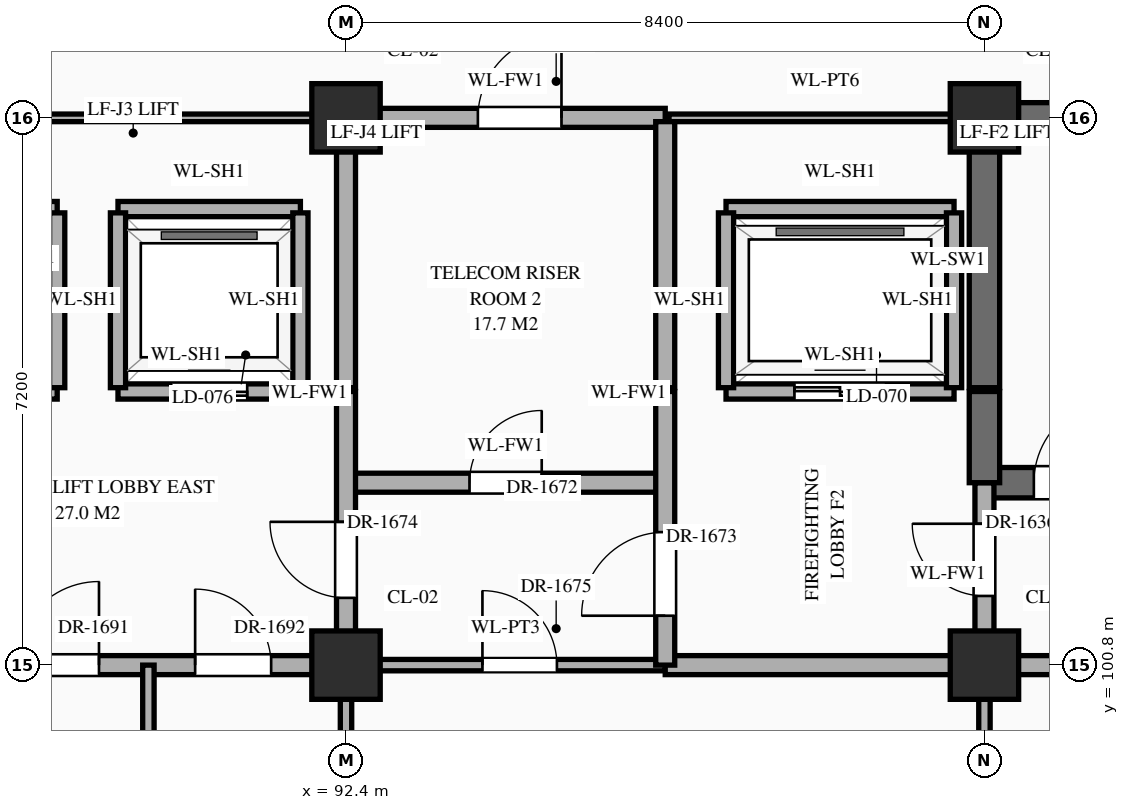
"""IFC4 building model, lengths in metres.
Left out: names, types, materials, properties, quantities, classifications, styles, units other than length and angle.
Written with IfcOpenShell. Run it as: python <this file> out.ifc"""

import sys

from ifc_helpers import new_model, si_unit, direction, frame, frame_2d, origin, origin_2d, place, context, subcontext, project, spatial, rectangle, extrude, element, fill, save


model = new_model("IFC4")
c1 = context("Model", 3, precision=1e-05, world=origin(), true_north=direction((0.0, 1.0)))
c2 = subcontext(c1, "Body", "Model", "MODEL_VIEW")
j1 = project(units=[si_unit("LENGTHUNIT", "METRE"), si_unit("PLANEANGLEUNIT", "RADIAN")], contexts=[c1])
p1 = place(None, origin())
s1 = spatial("IfcSite", under=j1, at=p1, CompositionType="ELEMENT")
p2 = place(p1, origin())
s2 = spatial("IfcBuilding", under=s1, at=p2, CompositionType="ELEMENT")
p3 = place(p2, frame((0.0, 0.0, 16.2)))
s3 = spatial("IfcBuildingStorey", under=s2, at=p3, CompositionType="ELEMENT", Elevation=16.2)
for number, where, z_axis, x_axis in (
    (1, (92.4, 100.8, 0.0), (0.0, 0.0, 1.0), (1.0, 0.0, 0.0)),
    (2, (92.4, 108.0, 0.0), (0.0, 0.0, 1.0), (1.0, 0.0, 0.0)),
    (3, (100.8, 100.8, 0.0), (0.0, 0.0, 1.0), (1.0, 0.0, 0.0)),
    (4, (100.8, 108.0, 0.0), (0.0, 0.0, 1.0), (1.0, 0.0, 0.0)),
):
    element("IfcColumn", number, at=place(p3, frame(where, z_axis=z_axis, x_axis=x_axis)), inside=s3, PredefinedType="COLUMN", context=c2, shape_type="SweptSolid", body=[
        extrude(rectangle(XDim=0.9, YDim=0.9, at=origin_2d()), origin(), (0.0, 0.0, 1.0), 5.4),
    ])
p4 = place(p3, frame((75.6, 100.8, 0.0), z_axis=(0.0, 0.0, 1.0), x_axis=(1.0, 0.0, 0.0)))
e5 = element("IfcWall", 5, at=p4, inside=s3, PredefinedType="STANDARD", context=c2, shape_type="SweptSolid", body=[
    extrude(rectangle(XDim=16.8, YDim=0.25, at=frame_2d((8.4, 0.0))), origin(), (0.0, 0.0, 1.0), 4.27),
])
p5 = place(p4, frame((3.65, 0.0, 0.0)))
e6 = element("IfcOpeningElement", 6, at=p5, cuts=e5, PredefinedType="OPENING", context=c2, shape_type="SweptSolid", body=[
    extrude(rectangle(XDim=1.1, YDim=2.2, at=frame_2d((0.55, 1.1))), frame((0.0, 0.137, 0.0), z_axis=(0.0, -1.0, 0.0), x_axis=(1.0, 0.0, 0.0)), (0.0, 0.0, 1.0), 0.274),
])
p6 = place(p4, frame((9.81, 0.0, 0.0)))
e7 = element("IfcOpeningElement", 7, at=p6, cuts=e5, PredefinedType="OPENING", context=c2, shape_type="SweptSolid", body=[
    extrude(rectangle(XDim=0.95, YDim=2.15, at=frame_2d((0.475, 1.075))), frame((0.0, 0.137, 0.0), z_axis=(0.0, -1.0, 0.0), x_axis=(1.0, 0.0, 0.0)), (0.0, 0.0, 1.0), 0.274),
])
p7 = place(p4, frame((12.45, 0.0, 0.0)))
e8 = element("IfcOpeningElement", 8, at=p7, cuts=e5, PredefinedType="OPENING", context=c2, shape_type="SweptSolid", body=[
    extrude(rectangle(XDim=1.1, YDim=2.2, at=frame_2d((0.55, 1.1))), frame((0.0, 0.137, 0.0), z_axis=(0.0, -1.0, 0.0), x_axis=(1.0, 0.0, 0.0)), (0.0, 0.0, 1.0), 0.274),
])
p8 = place(p4, frame((14.815, 0.0, 0.0)))
e9 = element("IfcOpeningElement", 9, at=p8, cuts=e5, PredefinedType="OPENING", context=c2, shape_type="SweptSolid", body=[
    extrude(rectangle(XDim=1.0, YDim=2.2, at=frame_2d((0.5, 1.1))), frame((0.0, 0.137, 0.0), z_axis=(0.0, -1.0, 0.0), x_axis=(1.0, 0.0, 0.0)), (0.0, 0.0, 1.0), 0.274),
])
p9 = place(p3, frame((92.4, 100.8, 0.0), z_axis=(0.0, 0.0, 1.0), x_axis=(1.0, 0.0, 0.0)))
e10 = element("IfcWall", 10, at=p9, inside=s3, PredefinedType="STANDARD", context=c2, shape_type="SweptSolid", body=[
    extrude(rectangle(XDim=4.2, YDim=0.15, at=frame_2d((2.1, 0.0))), origin(), (0.0, 0.0, 1.0), 4.27),
])
p10 = place(p9, frame((1.795, 0.0, 0.0)))
e11 = element("IfcOpeningElement", 11, at=p10, cuts=e10, PredefinedType="OPENING", context=c2, shape_type="SweptSolid", body=[
    extrude(rectangle(XDim=0.98, YDim=2.35, at=frame_2d((0.49, 1.175))), frame((0.0, 0.087, 0.0), z_axis=(0.0, -1.0, 0.0), x_axis=(1.0, 0.0, 0.0)), (0.0, 0.0, 1.0), 0.174),
])
p11 = place(p3, frame((96.6, 100.8, 0.0), z_axis=(0.0, 0.0, 1.0), x_axis=(1.0, 0.0, 0.0)))
e12 = element("IfcWall", 12, at=p11, inside=s3, PredefinedType="STANDARD", context=c2, shape_type="SweptSolid", body=[
    extrude(rectangle(XDim=12.6, YDim=0.25, at=frame_2d((6.3, 0.0))), origin(), (0.0, 0.0, 1.0), 4.27),
])
p12 = place(p11, frame((7.9, 0.0, 0.0)))
e13 = element("IfcOpeningElement", 13, at=p12, cuts=e12, PredefinedType="OPENING", context=c2, shape_type="SweptSolid", body=[
    extrude(rectangle(XDim=1.0, YDim=2.2, at=frame_2d((0.5, 1.1))), frame((0.0, 0.137, 0.0), z_axis=(0.0, -1.0, 0.0), x_axis=(1.0, 0.0, 0.0)), (0.0, 0.0, 1.0), 0.274),
])
p13 = place(p3, frame((92.4, 103.2, 0.0), z_axis=(0.0, 0.0, 1.0), x_axis=(1.0, 0.0, 0.0)))
e14 = element("IfcWall", 14, at=p13, inside=s3, PredefinedType="STANDARD", context=c2, shape_type="SweptSolid", body=[
    extrude(rectangle(XDim=4.2, YDim=0.25, at=frame_2d((2.1, 0.0))), origin(), (0.0, 0.0, 1.0), 5.12),
])
p14 = place(p13, frame((1.625, 0.0, 0.0)))
e15 = element("IfcOpeningElement", 15, at=p14, cuts=e14, PredefinedType="OPENING", context=c2, shape_type="SweptSolid", body=[
    extrude(rectangle(XDim=0.95, YDim=2.15, at=frame_2d((0.475, 1.075))), frame((0.0, 0.137, 0.0), z_axis=(0.0, -1.0, 0.0), x_axis=(1.0, 0.0, 0.0)), (0.0, 0.0, 1.0), 0.274),
])
p15 = place(p3, frame((100.8, 103.2, 0.0), z_axis=(0.0, 0.0, 1.0), x_axis=(1.0, 0.0, 0.0)))
e16 = element("IfcWall", 16, at=p15, inside=s3, PredefinedType="SHEAR", context=c2, shape_type="SweptSolid", body=[
    extrude(rectangle(XDim=8.4, YDim=0.4, at=frame_2d((4.2, 0.0))), origin(), (0.0, 0.0, 1.0), 5.12),
])
p16 = place(p15, frame((0.65, 0.0, 0.0)))
e17 = element("IfcOpeningElement", 17, at=p16, cuts=e16, PredefinedType="OPENING", context=c2, shape_type="SweptSolid", body=[
    extrude(rectangle(XDim=1.1, YDim=2.2, at=frame_2d((0.55, 1.1))), frame((0.0, 0.212, 0.0), z_axis=(0.0, -1.0, 0.0), x_axis=(1.0, 0.0, 0.0)), (0.0, 0.0, 1.0), 0.424),
])
p17 = place(p3, frame((86.2, 104.4, 0.0), z_axis=(0.0, 0.0, 1.0), x_axis=(1.0, 0.0, 0.0)))
e18 = element("IfcWall", 18, at=p17, inside=s3, PredefinedType="STANDARD", context=c2, shape_type="SweptSolid", body=[
    extrude(rectangle(XDim=2.4, YDim=0.2, at=frame_2d((1.2, 0.0))), origin(), (0.0, 0.0, 1.0), 5.12),
])
p18 = place(p17, frame((0.7, 0.0, 0.0)))
e19 = element("IfcOpeningElement", 19, at=p18, cuts=e18, PredefinedType="OPENING", context=c2, shape_type="SweptSolid", body=[
    extrude(rectangle(XDim=1.0, YDim=2.15, at=frame_2d((0.5, 1.075))), frame((0.0, 0.112, 0.0), z_axis=(0.0, -1.0, 0.0), x_axis=(1.0, 0.0, 0.0)), (0.0, 0.0, 1.0), 0.224),
])
p19 = place(p3, frame((89.4, 104.4, 0.0), z_axis=(0.0, 0.0, 1.0), x_axis=(1.0, 0.0, 0.0)))
e20 = element("IfcWall", 20, at=p19, inside=s3, PredefinedType="STANDARD", context=c2, shape_type="SweptSolid", body=[
    extrude(rectangle(XDim=2.4, YDim=0.2, at=frame_2d((1.2, 0.0))), origin(), (0.0, 0.0, 1.0), 5.12),
])
p20 = place(p19, frame((0.7, 0.0, 0.0)))
e21 = element("IfcOpeningElement", 21, at=p20, cuts=e20, PredefinedType="OPENING", context=c2, shape_type="SweptSolid", body=[
    extrude(rectangle(XDim=1.0, YDim=2.15, at=frame_2d((0.5, 1.075))), frame((0.0, 0.112, 0.0), z_axis=(0.0, -1.0, 0.0), x_axis=(1.0, 0.0, 0.0)), (0.0, 0.0, 1.0), 0.224),
])
p21 = place(p3, frame((97.4, 104.4, 0.0), z_axis=(0.0, 0.0, 1.0), x_axis=(1.0, 0.0, 0.0)))
e22 = element("IfcWall", 22, at=p21, inside=s3, PredefinedType="STANDARD", context=c2, shape_type="SweptSolid", body=[
    extrude(rectangle(XDim=3.0, YDim=0.2, at=frame_2d((1.5, 0.0))), origin(), (0.0, 0.0, 1.0), 5.12),
])
p22 = place(p21, frame((0.9, 0.0, 0.0)))
e23 = element("IfcOpeningElement", 23, at=p22, cuts=e22, PredefinedType="OPENING", context=c2, shape_type="SweptSolid", body=[
    extrude(rectangle(XDim=1.2, YDim=2.15, at=frame_2d((0.6, 1.075))), frame((0.0, 0.112, 0.0), z_axis=(0.0, -1.0, 0.0), x_axis=(1.0, 0.0, 0.0)), (0.0, 0.0, 1.0), 0.224),
])
for number, where, z_axis, x_axis in (
    (24, (86.2, 106.8, 0.0), (0.0, 0.0, 1.0), (1.0, 0.0, 0.0)),
    (25, (89.4, 106.8, 0.0), (0.0, 0.0, 1.0), (1.0, 0.0, 0.0)),
):
    element("IfcWall", number, at=place(p3, frame(where, z_axis=z_axis, x_axis=x_axis)), inside=s3, PredefinedType="STANDARD", context=c2, shape_type="SweptSolid", body=[
        extrude(rectangle(XDim=2.4, YDim=0.2, at=frame_2d((1.2, 0.0))), origin(), (0.0, 0.0, 1.0), 5.12),
    ])
p23 = place(p3, frame((97.4, 106.8, 0.0), z_axis=(0.0, 0.0, 1.0), x_axis=(1.0, 0.0, 0.0)))
e26 = element("IfcWall", 26, at=p23, inside=s3, PredefinedType="STANDARD", context=c2, shape_type="SweptSolid", body=[
    extrude(rectangle(XDim=3.0, YDim=0.2, at=frame_2d((1.5, 0.0))), origin(), (0.0, 0.0, 1.0), 5.12),
])
p24 = place(p3, frame((86.2, 108.0, 0.0), z_axis=(0.0, 0.0, 1.0), x_axis=(1.0, 0.0, 0.0)))
e27 = element("IfcWall", 27, at=p24, inside=s3, PredefinedType="STANDARD", context=c2, shape_type="SweptSolid", body=[
    extrude(rectangle(XDim=6.15, YDim=0.1, at=frame_2d((3.075, 0.0))), origin(), (0.0, 0.0, 1.0), 4.27),
])
p25 = place(p3, frame((92.4, 108.0, 0.0), z_axis=(0.0, 0.0, 1.0), x_axis=(1.0, 0.0, 0.0)))
e28 = element("IfcWall", 28, at=p25, inside=s3, PredefinedType="STANDARD", context=c2, shape_type="SweptSolid", body=[
    extrude(rectangle(XDim=4.2, YDim=0.25, at=frame_2d((2.1, 0.0))), origin(), (0.0, 0.0, 1.0), 4.27),
])
p26 = place(p25, frame((1.735, 0.0, 0.0)))
e29 = element("IfcOpeningElement", 29, at=p26, cuts=e28, PredefinedType="OPENING", context=c2, shape_type="SweptSolid", body=[
    extrude(rectangle(XDim=1.1, YDim=2.2, at=frame_2d((0.55, 1.1))), frame((0.0, 0.137, 0.0), z_axis=(0.0, -1.0, 0.0), x_axis=(1.0, 0.0, 0.0)), (0.0, 0.0, 1.0), 0.274),
])
p27 = place(p3, frame((96.65, 108.0, 0.0), z_axis=(0.0, 0.0, 1.0), x_axis=(1.0, 0.0, 0.0)))
e30 = element("IfcWall", 30, at=p27, inside=s3, PredefinedType="STANDARD", context=c2, shape_type="SweptSolid", body=[
    extrude(rectangle(XDim=4.1, YDim=0.1, at=frame_2d((2.05, 0.0))), origin(), (0.0, 0.0, 1.0), 4.27),
])
p28 = place(p3, frame((100.8, 108.0, 0.0), z_axis=(0.0, 0.0, 1.0), x_axis=(1.0, 0.0, 0.0)))
e31 = element("IfcWall", 31, at=p28, inside=s3, PredefinedType="SHEAR", context=c2, shape_type="SweptSolid", body=[
    extrude(rectangle(XDim=8.4, YDim=0.4, at=frame_2d((4.2, 0.0))), origin(), (0.0, 0.0, 1.0), 5.12),
])
for number, where, z_axis, x_axis in (
    (32, (88.6, 104.45, 0.0), (0.0, 0.0, 1.0), (0.0, 1.0, 0.0)),
    (33, (89.4, 104.45, 0.0), (0.0, 0.0, 1.0), (0.0, 1.0, 0.0)),
):
    element("IfcWall", number, at=place(p3, frame(where, z_axis=z_axis, x_axis=x_axis)), inside=s3, PredefinedType="STANDARD", context=c2, shape_type="SweptSolid", body=[
        extrude(rectangle(XDim=2.3, YDim=0.2, at=frame_2d((1.15, 0.0))), origin(), (0.0, 0.0, 1.0), 5.12),
    ])
p29 = place(p3, frame((89.8, 96.0, 0.0), z_axis=(0.0, 0.0, 1.0), x_axis=(0.0, 1.0, 0.0)))
e34 = element("IfcWall", 34, at=p29, inside=s3, PredefinedType="STANDARD", context=c2, shape_type="SweptSolid", body=[
    extrude(rectangle(XDim=4.8, YDim=0.15, at=frame_2d((2.4, 0.0))), origin(), (0.0, 0.0, 1.0), 5.12),
])
p30 = place(p29, frame((1.89, 0.0, 0.0)))
e35 = element("IfcOpeningElement", 35, at=p30, cuts=e34, PredefinedType="OPENING", context=c2, shape_type="SweptSolid", body=[
    extrude(rectangle(XDim=1.02, YDim=2.4, at=frame_2d((0.51, 1.2))), frame((0.0, 0.087, 0.0), z_axis=(0.0, -1.0, 0.0), x_axis=(1.0, 0.0, 0.0)), (0.0, 0.0, 1.0), 0.174),
])
p31 = place(p3, frame((91.8, 104.45, 0.0), z_axis=(0.0, 0.0, 1.0), x_axis=(0.0, 1.0, 0.0)))
e36 = element("IfcWall", 36, at=p31, inside=s3, PredefinedType="STANDARD", context=c2, shape_type="SweptSolid", body=[
    extrude(rectangle(XDim=2.3, YDim=0.2, at=frame_2d((1.15, 0.0))), origin(), (0.0, 0.0, 1.0), 5.12),
])
p32 = place(p3, frame((92.4, 96.0, 0.0), z_axis=(0.0, 0.0, 1.0), x_axis=(0.0, 1.0, 0.0)))
e37 = element("IfcWall", 37, at=p32, inside=s3, PredefinedType="STANDARD", context=c2, shape_type="SweptSolid", body=[
    extrude(rectangle(XDim=4.8, YDim=0.15, at=frame_2d((2.4, 0.0))), origin(), (0.0, 0.0, 1.0), 4.37),
])
p33 = place(p3, frame((92.4, 100.8, 0.0), z_axis=(0.0, 0.0, 1.0), x_axis=(0.0, 1.0, 0.0)))
e38 = element("IfcWall", 38, at=p33, inside=s3, PredefinedType="STANDARD", context=c2, shape_type="SweptSolid", body=[
    extrude(rectangle(XDim=3.6, YDim=0.25, at=frame_2d((1.8, 0.0))), origin(), (0.0, 0.0, 1.0), 4.37),
])
p34 = place(p33, frame((0.885, 0.0, 0.0)))
e39 = element("IfcOpeningElement", 39, at=p34, cuts=e38, PredefinedType="OPENING", context=c2, shape_type="SweptSolid", body=[
    extrude(rectangle(XDim=1.0, YDim=2.2, at=frame_2d((0.5, 1.1))), frame((0.0, 0.137, 0.0), z_axis=(0.0, -1.0, 0.0), x_axis=(1.0, 0.0, 0.0)), (0.0, 0.0, 1.0), 0.274),
])
p35 = place(p3, frame((92.4, 104.45, 0.0), z_axis=(0.0, 0.0, 1.0), x_axis=(0.0, 1.0, 0.0)))
e40 = element("IfcWall", 40, at=p35, inside=s3, PredefinedType="STANDARD", context=c2, shape_type="SweptSolid", body=[
    extrude(rectangle(XDim=3.5, YDim=0.25, at=frame_2d((1.75, 0.0))), origin(), (0.0, 0.0, 1.0), 4.37),
])
p36 = place(p3, frame((96.6, 100.8, 0.0), z_axis=(0.0, 0.0, 1.0), x_axis=(0.0, 1.0, 0.0)))
e41 = element("IfcWall", 41, at=p36, inside=s3, PredefinedType="STANDARD", context=c2, shape_type="SweptSolid", body=[
    extrude(rectangle(XDim=3.6, YDim=0.25, at=frame_2d((1.8, 0.0))), origin(), (0.0, 0.0, 1.0), 4.72),
])
p37 = place(p36, frame((0.65, 0.0, 0.0)))
e42 = element("IfcOpeningElement", 42, at=p37, cuts=e41, PredefinedType="OPENING", context=c2, shape_type="SweptSolid", body=[
    extrude(rectangle(XDim=1.1, YDim=2.2, at=frame_2d((0.55, 1.1))), frame((0.0, 0.137, 0.0), z_axis=(0.0, -1.0, 0.0), x_axis=(1.0, 0.0, 0.0)), (0.0, 0.0, 1.0), 0.274),
])
p38 = place(p3, frame((96.6, 104.45, 0.0), z_axis=(0.0, 0.0, 1.0), x_axis=(0.0, 1.0, 0.0)))
e43 = element("IfcWall", 43, at=p38, inside=s3, PredefinedType="STANDARD", context=c2, shape_type="SweptSolid", body=[
    extrude(rectangle(XDim=3.5, YDim=0.25, at=frame_2d((1.75, 0.0))), origin(), (0.0, 0.0, 1.0), 4.72),
])
for number, where, z_axis, x_axis in (
    (44, (97.4, 104.45, 0.0), (0.0, 0.0, 1.0), (0.0, 1.0, 0.0)),
    (45, (100.4, 104.45, 0.0), (0.0, 0.0, 1.0), (0.0, 1.0, 0.0)),
):
    element("IfcWall", number, at=place(p3, frame(where, z_axis=z_axis, x_axis=x_axis)), inside=s3, PredefinedType="STANDARD", context=c2, shape_type="SweptSolid", body=[
        extrude(rectangle(XDim=2.3, YDim=0.2, at=frame_2d((1.15, 0.0))), origin(), (0.0, 0.0, 1.0), 5.12),
    ])
p39 = place(p3, frame((100.8, 96.0, 0.0), z_axis=(0.0, 0.0, 1.0), x_axis=(0.0, 1.0, 0.0)))
e46 = element("IfcWall", 46, at=p39, inside=s3, PredefinedType="STANDARD", context=c2, shape_type="SweptSolid", body=[
    extrude(rectangle(XDim=4.8, YDim=0.15, at=frame_2d((2.4, 0.0))), origin(), (0.0, 0.0, 1.0), 4.37),
])
p40 = place(p3, frame((100.8, 100.8, 0.0), z_axis=(0.0, 0.0, 1.0), x_axis=(0.0, 1.0, 0.0)))
e47 = element("IfcWall", 47, at=p40, inside=s3, PredefinedType="STANDARD", context=c2, shape_type="SweptSolid", body=[
    extrude(rectangle(XDim=2.4, YDim=0.25, at=frame_2d((1.2, 0.0))), origin(), (0.0, 0.0, 1.0), 4.37),
])
p41 = place(p40, frame((0.91, 0.0, 0.0)))
e48 = element("IfcOpeningElement", 48, at=p41, cuts=e47, PredefinedType="OPENING", context=c2, shape_type="SweptSolid", body=[
    extrude(rectangle(XDim=0.95, YDim=2.15, at=frame_2d((0.475, 1.075))), frame((0.0, 0.137, 0.0), z_axis=(0.0, -1.0, 0.0), x_axis=(1.0, 0.0, 0.0)), (0.0, 0.0, 1.0), 0.274),
])
p42 = place(p3, frame((100.8, 103.2, 0.0), z_axis=(0.0, 0.0, 1.0), x_axis=(0.0, 1.0, 0.0)))
e49 = element("IfcWall", 49, at=p42, inside=s3, PredefinedType="SHEAR", context=c2, shape_type="SweptSolid", body=[
    extrude(rectangle(XDim=1.2, YDim=0.4, at=frame_2d((0.6, 0.0))), origin(), (0.0, 0.0, 1.0), 5.12),
])
p43 = place(p3, frame((100.8, 104.45, 0.0), z_axis=(0.0, 0.0, 1.0), x_axis=(0.0, 1.0, 0.0)))
e50 = element("IfcWall", 50, at=p43, inside=s3, PredefinedType="SHEAR", context=c2, shape_type="SweptSolid", body=[
    extrude(rectangle(XDim=3.5, YDim=0.4, at=frame_2d((1.75, 0.0))), origin(), (0.0, 0.0, 1.0), 5.12),
])
p44 = place(p22, origin())
e51 = element("IfcDoor", 51, at=p44, inside=s3, OperationType="DOUBLE_DOOR_SLIDING", PredefinedType="DOOR", context=c2, shape_type="SweptSolid", body=[
    extrude(rectangle(XDim=1.2, YDim=2.15, at=frame_2d((0.6, 1.075))), frame((0.0, 0.025, 0.0), z_axis=(0.0, -1.0, 0.0), x_axis=(1.0, 0.0, 0.0)), (0.0, 0.0, 1.0), 0.05),
])
fill(e23, e51)
p45 = place(p20, origin())
e52 = element("IfcDoor", 52, at=p45, inside=s3, OperationType="DOUBLE_DOOR_SLIDING", PredefinedType="DOOR", context=c2, shape_type="SweptSolid", body=[
    extrude(rectangle(XDim=1.0, YDim=2.15, at=frame_2d((0.5, 1.075))), frame((0.0, 0.025, 0.0), z_axis=(0.0, -1.0, 0.0), x_axis=(1.0, 0.0, 0.0)), (0.0, 0.0, 1.0), 0.05),
])
fill(e21, e52)
p46 = place(p16, origin())
e53 = element("IfcDoor", 53, at=p46, inside=s3, OperationType="SINGLE_SWING_RIGHT", PredefinedType="DOOR", context=c2, shape_type="SweptSolid", body=[
    extrude(rectangle(XDim=1.1, YDim=2.2, at=frame_2d((0.55, 1.1))), frame((0.0, 0.025, 0.0), z_axis=(0.0, -1.0, 0.0), x_axis=(1.0, 0.0, 0.0)), (0.0, 0.0, 1.0), 0.05),
])
fill(e17, e53)
p47 = place(p41, origin())
e54 = element("IfcDoor", 54, at=p47, inside=s3, OperationType="SINGLE_SWING_RIGHT", PredefinedType="DOOR", context=c2, shape_type="SweptSolid", body=[
    extrude(rectangle(XDim=0.95, YDim=2.15, at=frame_2d((0.475, 1.075))), frame((0.0, 0.025, 0.0), z_axis=(0.0, -1.0, 0.0), x_axis=(1.0, 0.0, 0.0)), (0.0, 0.0, 1.0), 0.05),
])
fill(e48, e54)
p48 = place(p14, origin())
e55 = element("IfcDoor", 55, at=p48, inside=s3, OperationType="SINGLE_SWING_RIGHT", PredefinedType="DOOR", context=c2, shape_type="SweptSolid", body=[
    extrude(rectangle(XDim=0.95, YDim=2.15, at=frame_2d((0.475, 1.075))), frame((0.0, 0.025, 0.0), z_axis=(0.0, -1.0, 0.0), x_axis=(1.0, 0.0, 0.0)), (0.0, 0.0, 1.0), 0.05),
])
fill(e15, e55)
p49 = place(p37, origin())
e56 = element("IfcDoor", 56, at=p49, inside=s3, OperationType="SINGLE_SWING_LEFT", PredefinedType="DOOR", context=c2, shape_type="SweptSolid", body=[
    extrude(rectangle(XDim=1.1, YDim=2.2, at=frame_2d((0.55, 1.1))), frame((0.0, 0.025, 0.0), z_axis=(0.0, -1.0, 0.0), x_axis=(1.0, 0.0, 0.0)), (0.0, 0.0, 1.0), 0.05),
])
fill(e42, e56)
p50 = place(p34, origin())
e57 = element("IfcDoor", 57, at=p50, inside=s3, OperationType="SINGLE_SWING_RIGHT", PredefinedType="DOOR", context=c2, shape_type="SweptSolid", body=[
    extrude(rectangle(XDim=1.0, YDim=2.2, at=frame_2d((0.5, 1.1))), frame((0.0, 0.025, 0.0), z_axis=(0.0, -1.0, 0.0), x_axis=(1.0, 0.0, 0.0)), (0.0, 0.0, 1.0), 0.05),
])
fill(e39, e57)
p51 = place(p10, origin())
e58 = element("IfcDoor", 58, at=p51, inside=s3, OperationType="SINGLE_SWING_LEFT", PredefinedType="DOOR", context=c2, shape_type="SweptSolid", body=[
    extrude(rectangle(XDim=0.98, YDim=2.35, at=frame_2d((0.49, 1.175))), frame((0.0, 0.025, 0.0), z_axis=(0.0, -1.0, 0.0), x_axis=(1.0, 0.0, 0.0)), (0.0, 0.0, 1.0), 0.05),
])
fill(e11, e58)
p52 = place(p26, origin())
e59 = element("IfcDoor", 59, at=p52, inside=s3, OperationType="SINGLE_SWING_RIGHT", PredefinedType="DOOR", context=c2, shape_type="SweptSolid", body=[
    extrude(rectangle(XDim=1.1, YDim=2.2, at=frame_2d((0.55, 1.1))), frame((0.0, 0.025, 0.0), z_axis=(0.0, -1.0, 0.0), x_axis=(1.0, 0.0, 0.0)), (0.0, 0.0, 1.0), 0.05),
])
fill(e29, e59)
p53 = place(p7, origin())
e60 = element("IfcDoor", 60, at=p53, inside=s3, OperationType="SINGLE_SWING_RIGHT", PredefinedType="DOOR", context=c2, shape_type="SweptSolid", body=[
    extrude(rectangle(XDim=1.1, YDim=2.2, at=frame_2d((0.55, 1.1))), frame((0.0, 0.025, 0.0), z_axis=(0.0, -1.0, 0.0), x_axis=(1.0, 0.0, 0.0)), (0.0, 0.0, 1.0), 0.05),
])
fill(e8, e60)
p54 = place(p8, origin())
e61 = element("IfcDoor", 61, at=p54, inside=s3, OperationType="SINGLE_SWING_LEFT", PredefinedType="DOOR", context=c2, shape_type="SweptSolid", body=[
    extrude(rectangle(XDim=1.0, YDim=2.2, at=frame_2d((0.5, 1.1))), frame((0.0, 0.025, 0.0), z_axis=(0.0, -1.0, 0.0), x_axis=(1.0, 0.0, 0.0)), (0.0, 0.0, 1.0), 0.05),
])
fill(e9, e61)
save(model, sys.argv[1])
